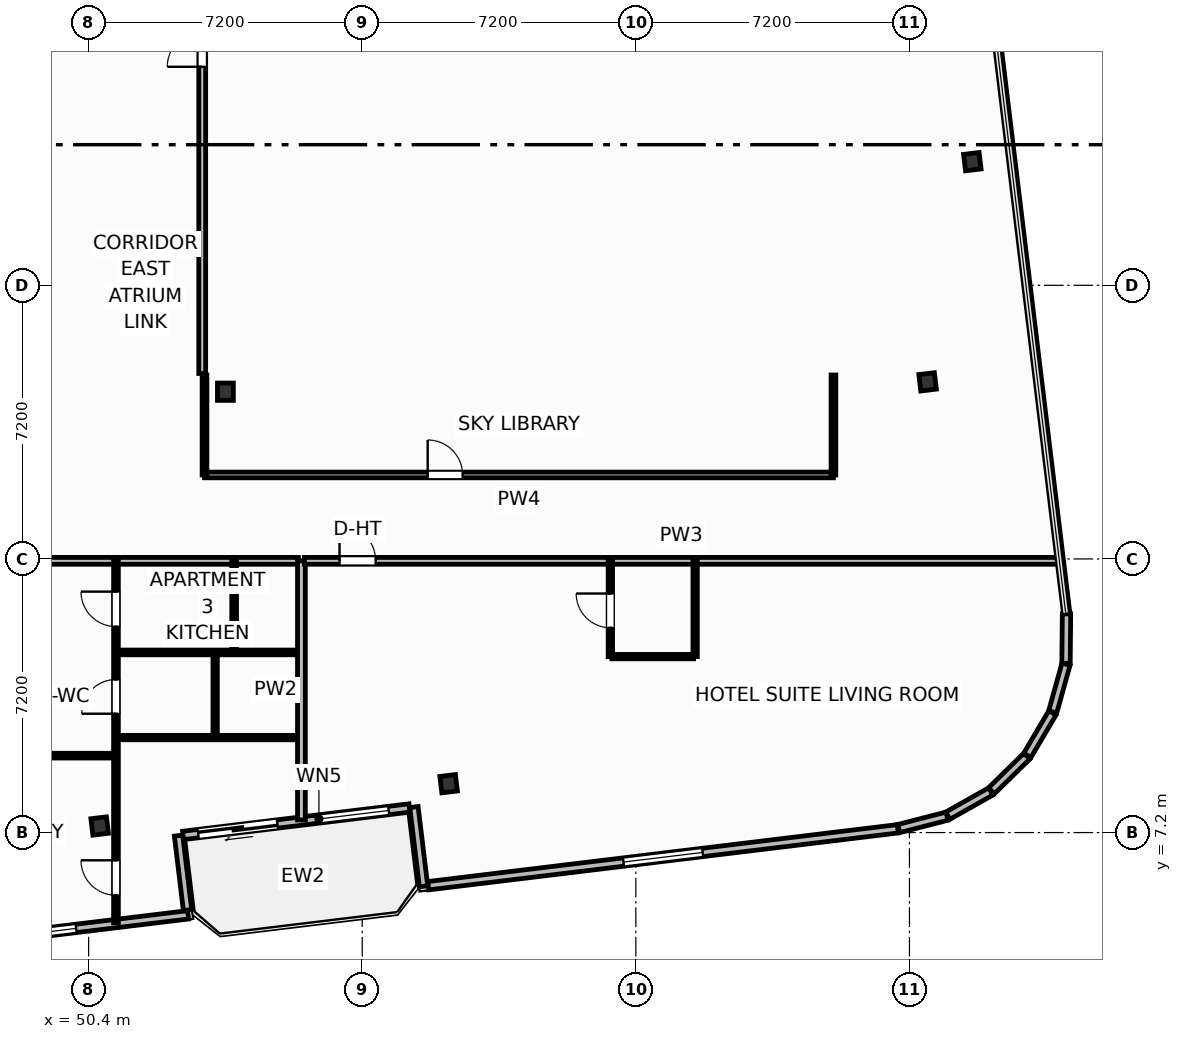
"""IFC4 building model, lengths in metres.
Left out: names, types, materials, properties, quantities, classifications, styles, units other than length and angle.
Written with IfcOpenShell. Run it as: python <this file> out.ifc"""

import sys

from ifc_helpers import new_model, si_unit, direction, frame, frame_2d, origin, origin_2d, place, context, subcontext, project, spatial, rectangle, i_section, extrude, element, fill, save


model = new_model("IFC4")
c1 = context("Model", 3, precision=1e-05, world=origin(), true_north=direction((0.0, 1.0)))
c2 = subcontext(c1, "Body", "Model", "MODEL_VIEW")
j1 = project(units=[si_unit("LENGTHUNIT", "METRE"), si_unit("PLANEANGLEUNIT", "RADIAN")], contexts=[c1])
p1 = place(None, origin())
s1 = spatial("IfcSite", under=j1, at=p1, CompositionType="ELEMENT")
p2 = place(p1, origin())
s2 = spatial("IfcBuilding", under=s1, at=p2, CompositionType="ELEMENT")
p3 = place(p2, frame((0.0, 0.0, 178.3)))
s3 = spatial("IfcBuildingStorey", under=s2, at=p3, CompositionType="ELEMENT", Elevation=178.3)
p4 = place(p3, frame((54.0, 18.8, 0.0), z_axis=(0.0, 0.0, 1.0), x_axis=(1.0, 0.0, 0.0)))
e1 = element("IfcColumn", 1, at=p4, inside=s3, PredefinedType="COLUMN", context=c2, shape_type="SweptSolid", body=[
    extrude(i_section(OverallWidth=0.418, OverallDepth=0.455, WebThickness=0.042, FlangeThickness=0.068, FilletRadius=0.025, at=origin_2d()), origin(), (0.0, 0.0, 1.0), 3.7),
])
for number, where, z_axis, x_axis in (
    (2, (50.691, 7.373, 0.0), (0.0, 0.0, 1.0), (0.993, 0.12, 0.0)),
    (3, (59.874, 8.486, 0.0), (0.0, 0.0, 1.0), (0.993, 0.12, 0.0)),
    (4, (72.477, 19.059, 0.0), (0.0, 0.0, 1.0), (0.993, 0.12, 0.0)),
    (5, (73.654, 24.853, 0.0), (0.0, 0.0, 1.0), (0.993, 0.12, 0.0)),
):
    element("IfcColumn", number, at=place(p3, frame(where, z_axis=z_axis, x_axis=x_axis)), inside=s3, PredefinedType="COLUMN", context=c2, shape_type="SweptSolid", body=[
        extrude(i_section(OverallWidth=0.412, OverallDepth=0.435, WebThickness=0.036, FlangeThickness=0.057, FilletRadius=0.025, at=origin_2d()), origin(), (0.0, 0.0, 1.0), 3.7),
    ])
p5 = place(p3, frame((58.843, 7.847, 0.0), z_axis=(0.0, 0.0, 1.0), x_axis=(-0.992729951822, -0.120362962556, 0.0)))
e6 = element("IfcWall", 6, at=p5, inside=s3, PredefinedType="SOLIDWALL", context=c2, shape_type="SweptSolid", body=[
    extrude(rectangle(XDim=6.0, YDim=0.22, at=frame_2d((3.0, 0.0))), origin(), (0.0, 0.0, 1.0), 2.73),
])
p6 = place(p5, frame((3.5, 0.0, 0.0)))
e7 = element("IfcOpeningElement", 7, at=p6, cuts=e6, PredefinedType="OPENING", context=c2, shape_type="SweptSolid", body=[
    extrude(rectangle(XDim=2.1, YDim=2.3, at=frame_2d((1.05, 1.15))), frame((0.0, 0.12, 0.0), z_axis=(0.0, -1.0, 0.0), x_axis=(1.0, 0.0, 0.0)), (0.0, 0.0, 1.0), 0.24),
])
p7 = place(p5, frame((0.55, 0.0, 0.75)))
e8 = element("IfcOpeningElement", 8, at=p7, cuts=e6, PredefinedType="OPENING", context=c2, shape_type="SweptSolid", body=[
    extrude(rectangle(XDim=1.85, YDim=1.75, at=frame_2d((0.925, 0.875))), frame((0.0, 0.12, 0.0), z_axis=(0.0, -1.0, 0.0), x_axis=(1.0, 0.0, 0.0)), (0.0, 0.0, 1.0), 0.24),
])
p8 = place(p3, frame((45.042, 4.069, 0.0), z_axis=(0.0, 0.0, 1.0), x_axis=(0.992731032022, 0.120354052946, 0.0)))
e9 = element("IfcWall", 9, at=p8, inside=s3, PredefinedType="SOLIDWALL", context=c2, shape_type="SweptSolid", body=[
    extrude(rectangle(XDim=8.035, YDim=0.22, at=frame_2d((4.018, 0.0))), origin(), (0.0, 0.0, 1.0), 2.73),
])
p9 = place(p8, frame((2.968, 0.0, 0.8)))
e10 = element("IfcOpeningElement", 10, at=p9, cuts=e9, PredefinedType="OPENING", context=c2, shape_type="SweptSolid", body=[
    extrude(rectangle(XDim=2.1, YDim=1.75, at=frame_2d((1.05, 0.875))), frame((0.0, 0.12, 0.0), z_axis=(0.0, -1.0, 0.0), x_axis=(1.0, 0.0, 0.0)), (0.0, 0.0, 1.0), 0.24),
])
p10 = place(p3, frame((53.004, 5.16, 0.0), z_axis=(0.0, 0.0, 1.0), x_axis=(-0.120397815541, 0.992725725472, 0.0)))
e11 = element("IfcWall", 11, at=p10, inside=s3, PredefinedType="SOLIDWALL", context=c2, shape_type="SweptSolid", body=[
    extrude(rectangle(XDim=1.975, YDim=0.22, at=frame_2d((0.988, 0.0))), origin(), (0.0, 0.0, 1.0), 2.73),
])
p11 = place(p3, frame((58.961, 7.872, 0.0), z_axis=(0.0, 0.0, 1.0), x_axis=(0.120327895535, -0.992734202874, 0.0)))
e12 = element("IfcWall", 12, at=p11, inside=s3, PredefinedType="SOLIDWALL", context=c2, shape_type="SweptSolid", body=[
    extrude(rectangle(XDim=2.1, YDim=0.22, at=frame_2d((1.05, 0.0))), origin(), (0.0, 0.0, 1.0), 2.73),
])
p12 = place(p3, frame((59.338, 5.802, 0.0), z_axis=(0.0, 0.0, 1.0), x_axis=(0.992731225757, 0.120352454927, 0.0)))
e13 = element("IfcWall", 13, at=p12, inside=s3, PredefinedType="SOLIDWALL", context=c2, shape_type="SweptSolid", body=[
    extrude(rectangle(XDim=12.447, YDim=0.22, at=frame_2d((6.224, 0.0))), origin(), (0.0, 0.0, 1.0), 2.73),
])
p13 = place(p12, frame((5.174, 0.0, 0.8)))
e14 = element("IfcOpeningElement", 14, at=p13, cuts=e13, PredefinedType="OPENING", context=c2, shape_type="SweptSolid", body=[
    extrude(rectangle(XDim=2.1, YDim=1.75, at=frame_2d((1.05, 0.875))), frame((0.0, 0.12, 0.0), z_axis=(0.0, -1.0, 0.0), x_axis=(1.0, 0.0, 0.0)), (0.0, 0.0, 1.0), 0.24),
])
p14 = place(p3, frame((71.719, 7.306, 0.0), z_axis=(0.0, 0.0, 1.0), x_axis=(0.968541764193, 0.248851061909, 0.0)))
e15 = element("IfcWall", 15, at=p14, inside=s3, PredefinedType="SOLIDWALL", context=c2, shape_type="SweptSolid", body=[
    extrude(rectangle(XDim=1.309, YDim=0.22, at=frame_2d((0.654, 0.0))), origin(), (0.0, 0.0, 1.0), 2.73),
])
for number, where, z_axis, x_axis in (
    (16, (73.008, 7.644, 0.0), (0.0, 0.0, 1.0), (0.871, 0.491, 0.0)),
    (17, (74.159, 8.3, 0.0), (0.0, 0.0, 1.0), (0.714, 0.7, 0.0)),
    (18, (75.101, 9.232, 0.0), (0.0, 0.0, 1.0), (0.509, 0.861, 0.0)),
    (19, (75.77, 10.376, 0.0), (0.0, 0.0, 1.0), (0.269, 0.963, 0.0)),
):
    element("IfcWall", number, at=place(p3, frame(where, z_axis=z_axis, x_axis=x_axis)), inside=s3, PredefinedType="SOLIDWALL", context=c2, shape_type="SweptSolid", body=[
        extrude(rectangle(XDim=1.301, YDim=0.22, at=frame_2d((0.65, 0.0))), origin(), (0.0, 0.0, 1.0), 2.73),
    ])
p15 = place(p3, frame((76.12, 11.654, 0.0), z_axis=(0.0, 0.0, 1.0), x_axis=(0.01032033607, 0.999946743914, 0.0)))
e20 = element("IfcWall", 20, at=p15, inside=s3, PredefinedType="SOLIDWALL", context=c2, shape_type="SweptSolid", body=[
    extrude(rectangle(XDim=1.301, YDim=0.22, at=frame_2d((0.65, 0.0))), origin(), (0.0, 0.0, 1.0), 2.73),
])
p16 = place(p3, frame((53.45, 16.61, 0.0), z_axis=(0.0, 0.0, 1.0), x_axis=(1.0, 0.0, 0.0)))
e21 = element("IfcWall", 21, at=p16, inside=s3, PredefinedType="PARTITIONING", context=c2, shape_type="SweptSolid", body=[
    extrude(rectangle(XDim=16.55, YDim=0.15, at=frame_2d((8.275, 0.0))), origin(), (0.0, 0.0, 1.0), 3.45),
])
p17 = place(p16, frame((5.873, 0.0, 0.0)))
e22 = element("IfcOpeningElement", 22, at=p17, cuts=e21, PredefinedType="OPENING", context=c2, shape_type="SweptSolid", body=[
    extrude(rectangle(XDim=0.92, YDim=2.05, at=frame_2d((0.46, 1.025))), frame((0.0, 0.085, 0.0), z_axis=(0.0, -1.0, 0.0), x_axis=(1.0, 0.0, 0.0)), (0.0, 0.0, 1.0), 0.17),
])
p18 = place(p3, frame((53.45, 16.61, 0.0), z_axis=(0.0, 0.0, 1.0), x_axis=(0.0, 1.0, 0.0)))
e23 = element("IfcWall", 23, at=p18, inside=s3, PredefinedType="PARTITIONING", context=c2, shape_type="SweptSolid", body=[
    extrude(rectangle(XDim=2.63, YDim=0.125, at=frame_2d((1.315, 0.0))), origin(), (0.0, 0.0, 1.0), 2.662),
])
p19 = place(p3, frame((70.0, 16.61, 0.0), z_axis=(0.0, 0.0, 1.0), x_axis=(0.0, 1.0, 0.0)))
e24 = element("IfcWall", 24, at=p19, inside=s3, PredefinedType="PARTITIONING", context=c2, shape_type="SweptSolid", body=[
    extrude(rectangle(XDim=2.63, YDim=0.125, at=frame_2d((1.315, 0.0))), origin(), (0.0, 0.0, 1.0), 3.45),
])
p20 = place(p3, frame((42.08, 9.224, 0.0), z_axis=(0.0, 0.0, 1.0), x_axis=(1.0, 0.0, 0.0)))
e25 = element("IfcWall", 25, at=p20, inside=s3, PredefinedType="PARTITIONING", context=c2, shape_type="SweptSolid", body=[
    extrude(rectangle(XDim=8.97, YDim=0.125, at=frame_2d((4.485, 0.0))), origin(), (0.0, 0.0, 1.0), 3.45),
])
p21 = place(p20, frame((4.037, 0.0, 0.0)))
e26 = element("IfcOpeningElement", 26, at=p21, cuts=e25, PredefinedType="OPENING", context=c2, shape_type="SweptSolid", body=[
    extrude(rectangle(XDim=0.92, YDim=2.05, at=frame_2d((0.46, 1.025))), frame((0.0, 0.073, 0.0), z_axis=(0.0, -1.0, 0.0), x_axis=(1.0, 0.0, 0.0)), (0.0, 0.0, 1.0), 0.145),
])
p22 = place(p3, frame((42.08, 14.35, 0.0), z_axis=(0.0, 0.0, 1.0), x_axis=(1.0, 0.0, 0.0)))
e27 = element("IfcWall", 27, at=p22, inside=s3, PredefinedType="PARTITIONING", context=c2, shape_type="SweptSolid", body=[
    extrude(rectangle(XDim=13.84, YDim=0.18, at=frame_2d((6.92, 0.0))), origin(), (0.0, 0.0, 1.0), 3.45),
])
p23 = place(p22, frame((3.985, 0.0, 0.0)))
e28 = element("IfcOpeningElement", 28, at=p23, cuts=e27, PredefinedType="OPENING", context=c2, shape_type="SweptSolid", body=[
    extrude(rectangle(XDim=1.0, YDim=2.2, at=frame_2d((0.5, 1.1))), frame((0.0, 0.1, 0.0), z_axis=(0.0, -1.0, 0.0), x_axis=(1.0, 0.0, 0.0)), (0.0, 0.0, 1.0), 0.2),
])
p24 = place(p3, frame((51.12, 4.826, 0.0), z_axis=(0.0, 0.0, 1.0), x_axis=(0.0, 1.0, 0.0)))
e29 = element("IfcWall", 29, at=p24, inside=s3, PredefinedType="PARTITIONING", context=c2, shape_type="SweptSolid", body=[
    extrude(rectangle(XDim=9.524, YDim=0.125, at=frame_2d((4.762, 0.0))), origin(), (0.0, 0.0, 1.0), 2.662),
])
p25 = place(p24, frame((0.725, 0.0, 0.0)))
e30 = element("IfcOpeningElement", 30, at=p25, cuts=e29, PredefinedType="OPENING", context=c2, shape_type="SweptSolid", body=[
    extrude(rectangle(XDim=0.92, YDim=2.05, at=frame_2d((0.46, 1.025))), frame((0.0, 0.073, 0.0), z_axis=(0.0, -1.0, 0.0), x_axis=(1.0, 0.0, 0.0)), (0.0, 0.0, 1.0), 0.145),
])
p26 = place(p24, frame((5.502, 0.0, 0.0)))
e31 = element("IfcOpeningElement", 31, at=p26, cuts=e29, PredefinedType="OPENING", context=c2, shape_type="SweptSolid", body=[
    extrude(rectangle(XDim=0.9, YDim=2.05, at=frame_2d((0.45, 1.025))), frame((0.0, 0.073, 0.0), z_axis=(0.0, -1.0, 0.0), x_axis=(1.0, 0.0, 0.0)), (0.0, 0.0, 1.0), 0.145),
])
p27 = place(p24, frame((7.794, 0.0, 0.0)))
e32 = element("IfcOpeningElement", 32, at=p27, cuts=e29, PredefinedType="OPENING", context=c2, shape_type="SweptSolid", body=[
    extrude(rectangle(XDim=0.92, YDim=2.05, at=frame_2d((0.46, 1.025))), frame((0.0, 0.073, 0.0), z_axis=(0.0, -1.0, 0.0), x_axis=(1.0, 0.0, 0.0)), (0.0, 0.0, 1.0), 0.145),
])
p28 = place(p3, frame((51.19, 11.94, 0.0), z_axis=(0.0, 0.0, 1.0), x_axis=(1.0, 0.0, 0.0)))
e33 = element("IfcWall", 33, at=p28, inside=s3, PredefinedType="PARTITIONING", context=c2, shape_type="SweptSolid", body=[
    extrude(rectangle(XDim=4.73, YDim=0.125, at=frame_2d((2.365, 0.0))), origin(), (0.0, 0.0, 1.0), 3.018),
])
p29 = place(p3, frame((51.19, 9.7, 0.0), z_axis=(0.0, 0.0, 1.0), x_axis=(1.0, 0.0, 0.0)))
e34 = element("IfcWall", 34, at=p29, inside=s3, PredefinedType="PARTITIONING", context=c2, shape_type="SweptSolid", body=[
    extrude(rectangle(XDim=4.73, YDim=0.115, at=frame_2d((2.365, 0.0))), origin(), (0.0, 0.0, 1.0), 3.45),
])
p30 = place(p3, frame((54.23, 11.94, 0.0), z_axis=(0.0, 0.0, 1.0), x_axis=(0.0, 1.0, 0.0)))
e35 = element("IfcWall", 35, at=p30, inside=s3, PredefinedType="PARTITIONING", context=c2, shape_type="SweptSolid", body=[
    extrude(rectangle(XDim=2.41, YDim=0.125, at=frame_2d((1.205, 0.0))), origin(), (0.0, 0.0, 1.0), 3.45),
])
p31 = place(p3, frame((53.73, 9.7, 0.0), z_axis=(0.0, 0.0, 1.0), x_axis=(0.0, 1.0, 0.0)))
e36 = element("IfcWall", 36, at=p31, inside=s3, PredefinedType="PARTITIONING", context=c2, shape_type="SweptSolid", body=[
    extrude(rectangle(XDim=2.24, YDim=0.115, at=frame_2d((1.12, 0.0))), origin(), (0.0, 0.0, 1.0), 3.45),
])
p32 = place(p3, frame((56.0, 7.533, 0.0), z_axis=(0.0, 0.0, 1.0), x_axis=(0.0, 1.0, 0.0)))
e37 = element("IfcWall", 37, at=p32, inside=s3, PredefinedType="PARTITIONING", context=c2, shape_type="SweptSolid", body=[
    extrude(rectangle(XDim=6.817, YDim=0.205, at=frame_2d((3.409, 0.0))), origin(), (0.0, 0.0, 1.0), 3.45),
])
p33 = place(p3, frame((56.08, 14.35, 0.0), z_axis=(0.0, 0.0, 1.0), x_axis=(1.0, 0.0, 0.0)))
e38 = element("IfcWall", 38, at=p33, inside=s3, PredefinedType="PARTITIONING", context=c2, shape_type="SweptSolid", body=[
    extrude(rectangle(XDim=19.825, YDim=0.18, at=frame_2d((9.912, 0.0))), origin(), (0.0, 0.0, 1.0), 3.45),
])
p34 = place(p33, frame((0.923, 0.0, 0.0)))
e39 = element("IfcOpeningElement", 39, at=p34, cuts=e38, PredefinedType="OPENING", context=c2, shape_type="SweptSolid", body=[
    extrude(rectangle(XDim=0.95, YDim=2.15, at=frame_2d((0.475, 1.075))), frame((0.0, 0.1, 0.0), z_axis=(0.0, -1.0, 0.0), x_axis=(1.0, 0.0, 0.0)), (0.0, 0.0, 1.0), 0.2),
])
p35 = place(p3, frame((64.17, 11.83, 0.0), z_axis=(0.0, 0.0, 1.0), x_axis=(1.0, 0.0, 0.0)))
e40 = element("IfcWall", 40, at=p35, inside=s3, PredefinedType="PARTITIONING", context=c2, shape_type="SweptSolid", body=[
    extrude(rectangle(XDim=2.15, YDim=0.115, at=frame_2d((1.075, 0.0))), origin(), (0.0, 0.0, 1.0), 3.45),
])
p36 = place(p3, frame((64.13, 11.83, 0.0), z_axis=(0.0, 0.0, 1.0), x_axis=(0.0, 1.0, 0.0)))
e41 = element("IfcWall", 41, at=p36, inside=s3, PredefinedType="PARTITIONING", context=c2, shape_type="SweptSolid", body=[
    extrude(rectangle(XDim=2.52, YDim=0.115, at=frame_2d((1.26, 0.0))), origin(), (0.0, 0.0, 1.0), 3.45),
])
p37 = place(p36, frame((0.76, 0.0, 0.0)))
e42 = element("IfcOpeningElement", 42, at=p37, cuts=e41, PredefinedType="OPENING", context=c2, shape_type="SweptSolid", body=[
    extrude(rectangle(XDim=0.9, YDim=2.05, at=frame_2d((0.45, 1.025))), frame((0.0, 0.067, 0.0), z_axis=(0.0, -1.0, 0.0), x_axis=(1.0, 0.0, 0.0)), (0.0, 0.0, 1.0), 0.135),
])
p38 = place(p3, frame((66.36, 11.83, 0.0), z_axis=(0.0, 0.0, 1.0), x_axis=(0.0, 1.0, 0.0)))
e43 = element("IfcWall", 43, at=p38, inside=s3, PredefinedType="PARTITIONING", context=c2, shape_type="SweptSolid", body=[
    extrude(rectangle(XDim=2.52, YDim=0.115, at=frame_2d((1.26, 0.0))), origin(), (0.0, 0.0, 1.0), 3.45),
])
p39 = place(p3, frame((53.39, 19.28, 0.0), z_axis=(0.0, 0.0, 1.0), x_axis=(0.0, 1.0, 0.0)))
e44 = element("IfcWall", 44, at=p39, inside=s3, PredefinedType="PARTITIONING", context=c2, shape_type="SweptSolid", body=[
    extrude(rectangle(XDim=20.02, YDim=0.18, at=frame_2d((10.01, 0.0))), origin(), (0.0, 0.0, 1.0), 3.45),
])
p40 = place(p39, frame((8.07, 0.0, 0.0)))
e45 = element("IfcOpeningElement", 45, at=p40, cuts=e44, PredefinedType="OPENING", context=c2, shape_type="SweptSolid", body=[
    extrude(rectangle(XDim=0.92, YDim=2.05, at=frame_2d((0.46, 1.025))), frame((0.0, 0.1, 0.0), z_axis=(0.0, -1.0, 0.0), x_axis=(1.0, 0.0, 0.0)), (0.0, 0.0, 1.0), 0.2),
])
p41 = place(p6, origin())
e46 = element("IfcDoor", 46, at=p41, inside=s3, OperationType="SLIDING_TO_LEFT", PredefinedType="DOOR", context=c2, shape_type="SweptSolid", body=[
    extrude(rectangle(XDim=2.1, YDim=2.3, at=frame_2d((1.05, 1.15))), frame((0.0, 0.025, 0.0), z_axis=(0.0, -1.0, 0.0), x_axis=(1.0, 0.0, 0.0)), (0.0, 0.0, 1.0), 0.05),
])
fill(e7, e46)
p42 = place(p7, origin())
e47 = element("IfcWindow", 47, at=p42, inside=s3, PartitioningType="SINGLE_PANEL", PredefinedType="WINDOW", context=c2, shape_type="SweptSolid", body=[
    extrude(rectangle(XDim=1.85, YDim=1.75, at=frame_2d((0.925, 0.875))), frame((0.0, 0.03, 0.0), z_axis=(0.0, -1.0, 0.0), x_axis=(1.0, 0.0, 0.0)), (0.0, 0.0, 1.0), 0.06),
])
fill(e8, e47)
p43 = place(p9, origin())
e48 = element("IfcWindow", 48, at=p43, inside=s3, PartitioningType="SINGLE_PANEL", PredefinedType="WINDOW", context=c2, shape_type="SweptSolid", body=[
    extrude(rectangle(XDim=2.1, YDim=1.75, at=frame_2d((1.05, 0.875))), frame((0.0, 0.03, 0.0), z_axis=(0.0, -1.0, 0.0), x_axis=(1.0, 0.0, 0.0)), (0.0, 0.0, 1.0), 0.06),
])
fill(e10, e48)
p44 = place(p13, origin())
e49 = element("IfcWindow", 49, at=p44, inside=s3, PartitioningType="SINGLE_PANEL", PredefinedType="WINDOW", context=c2, shape_type="SweptSolid", body=[
    extrude(rectangle(XDim=2.1, YDim=1.75, at=frame_2d((1.05, 0.875))), frame((0.0, 0.03, 0.0), z_axis=(0.0, -1.0, 0.0), x_axis=(1.0, 0.0, 0.0)), (0.0, 0.0, 1.0), 0.06),
])
fill(e14, e49)
p45 = place(p17, origin())
e50 = element("IfcDoor", 50, at=p45, inside=s3, OperationType="SINGLE_SWING_LEFT", PredefinedType="DOOR", context=c2, shape_type="SweptSolid", body=[
    extrude(rectangle(XDim=0.92, YDim=2.05, at=frame_2d((0.46, 1.025))), frame((0.0, 0.025, 0.0), z_axis=(0.0, -1.0, 0.0), x_axis=(1.0, 0.0, 0.0)), (0.0, 0.0, 1.0), 0.05),
])
fill(e22, e50)
p46 = place(p25, origin())
e51 = element("IfcDoor", 51, at=p46, inside=s3, OperationType="SINGLE_SWING_RIGHT", PredefinedType="DOOR", context=c2, shape_type="SweptSolid", body=[
    extrude(rectangle(XDim=0.92, YDim=2.05, at=frame_2d((0.46, 1.025))), frame((0.0, 0.025, 0.0), z_axis=(0.0, -1.0, 0.0), x_axis=(1.0, 0.0, 0.0)), (0.0, 0.0, 1.0), 0.05),
])
fill(e30, e51)
p47 = place(p26, origin())
e52 = element("IfcDoor", 52, at=p47, inside=s3, OperationType="SINGLE_SWING_LEFT", PredefinedType="DOOR", context=c2, shape_type="SweptSolid", body=[
    extrude(rectangle(XDim=0.9, YDim=2.05, at=frame_2d((0.45, 1.025))), frame((0.0, 0.025, 0.0), z_axis=(0.0, -1.0, 0.0), x_axis=(1.0, 0.0, 0.0)), (0.0, 0.0, 1.0), 0.05),
])
fill(e31, e52)
p48 = place(p27, origin())
e53 = element("IfcDoor", 53, at=p48, inside=s3, OperationType="SINGLE_SWING_RIGHT", PredefinedType="DOOR", context=c2, shape_type="SweptSolid", body=[
    extrude(rectangle(XDim=0.92, YDim=2.05, at=frame_2d((0.46, 1.025))), frame((0.0, 0.025, 0.0), z_axis=(0.0, -1.0, 0.0), x_axis=(1.0, 0.0, 0.0)), (0.0, 0.0, 1.0), 0.05),
])
fill(e32, e53)
p49 = place(p34, origin())
e54 = element("IfcDoor", 54, at=p49, inside=s3, OperationType="SINGLE_SWING_LEFT", PredefinedType="DOOR", context=c2, shape_type="SweptSolid", body=[
    extrude(rectangle(XDim=0.95, YDim=2.15, at=frame_2d((0.475, 1.075))), frame((0.0, 0.025, 0.0), z_axis=(0.0, -1.0, 0.0), x_axis=(1.0, 0.0, 0.0)), (0.0, 0.0, 1.0), 0.05),
])
fill(e39, e54)
p50 = place(p37, origin())
e55 = element("IfcDoor", 55, at=p50, inside=s3, OperationType="SINGLE_SWING_RIGHT", PredefinedType="DOOR", context=c2, shape_type="SweptSolid", body=[
    extrude(rectangle(XDim=0.9, YDim=2.05, at=frame_2d((0.45, 1.025))), frame((0.0, 0.025, 0.0), z_axis=(0.0, -1.0, 0.0), x_axis=(1.0, 0.0, 0.0)), (0.0, 0.0, 1.0), 0.05),
])
fill(e42, e55)
p51 = place(p40, origin())
e56 = element("IfcDoor", 56, at=p51, inside=s3, OperationType="SINGLE_SWING_LEFT", PredefinedType="DOOR", context=c2, shape_type="SweptSolid", body=[
    extrude(rectangle(XDim=0.92, YDim=2.05, at=frame_2d((0.46, 1.025))), frame((0.0, 0.025, 0.0), z_axis=(0.0, -1.0, 0.0), x_axis=(1.0, 0.0, 0.0)), (0.0, 0.0, 1.0), 0.05),
])
fill(e45, e56)
save(model, sys.argv[1])
